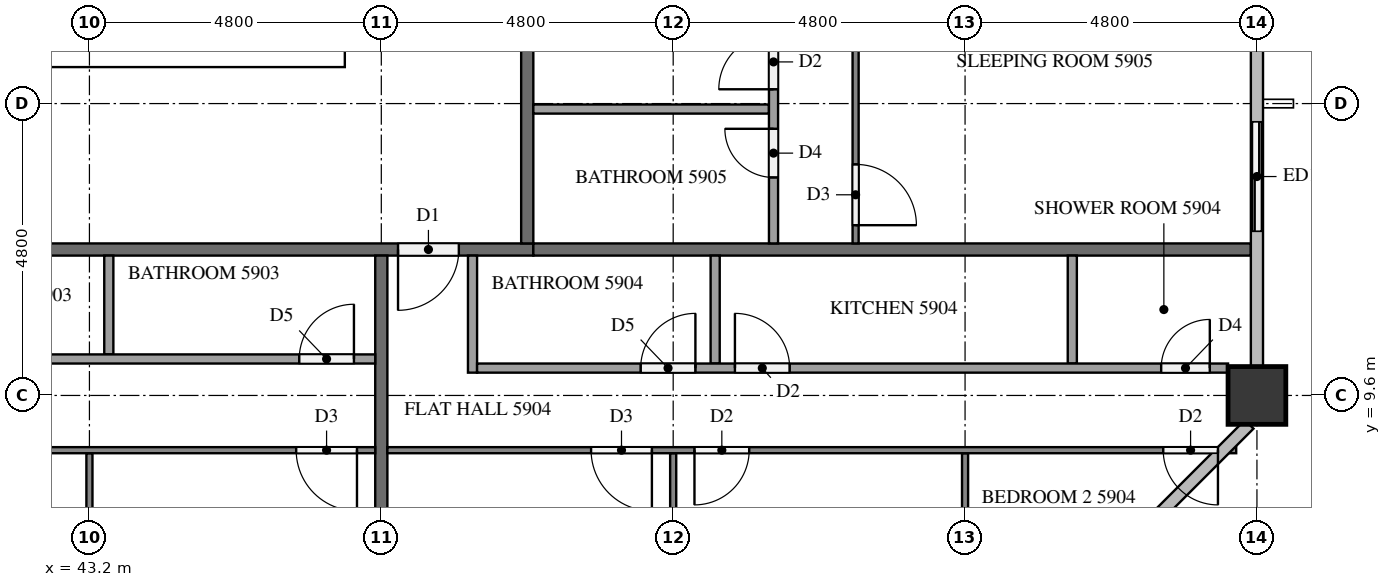
"""IFC4 building model, lengths in metres.
Left out: names, types, materials, properties, quantities, classifications, styles, units other than length and angle.
Written with IfcOpenShell. Run it as: python <this file> out.ifc"""

import sys

from ifc_helpers import new_model, si_unit, direction, frame, frame_2d, origin, origin_2d, place, context, subcontext, project, spatial, rectangle, extrude, element, fill, save


model = new_model("IFC4")
c1 = context("Model", 3, precision=1e-05, world=origin(), true_north=direction((0.0, 1.0)))
c2 = subcontext(c1, "Body", "Model", "MODEL_VIEW")
j1 = project(units=[si_unit("LENGTHUNIT", "METRE"), si_unit("PLANEANGLEUNIT", "RADIAN")], contexts=[c1])
p1 = place(None, origin())
s1 = spatial("IfcSite", under=j1, at=p1, CompositionType="ELEMENT")
p2 = place(p1, origin())
s2 = spatial("IfcBuilding", under=s1, at=p2, CompositionType="ELEMENT")
p3 = place(p2, frame((0.0, 0.0, 226.3)))
s3 = spatial("IfcBuildingStorey", under=s2, at=p3, CompositionType="ELEMENT", Elevation=226.3)
p4 = place(p3, frame((15.0, 15.35, 0.0), z_axis=(0.0, 0.0, 1.0), x_axis=(1.0, 0.0, 0.0)))
e1 = element("IfcWall", 1, at=p4, inside=s3, PredefinedType="SHEAR", context=c2, shape_type="SweptSolid", body=[
    extrude(rectangle(XDim=32.4, YDim=0.7, at=frame_2d((16.2, 0.0))), origin(), (0.0, 0.0, 1.0), 3.2),
])
p5 = place(p4, frame((15.3, 0.0, 0.0)))
e2 = element("IfcOpeningElement", 2, at=p5, cuts=e1, PredefinedType="OPENING", context=c2, shape_type="SweptSolid", body=[
    extrude(rectangle(XDim=1.8, YDim=2.1, at=frame_2d((0.9, 1.05))), frame((0.0, 0.36, 0.0), z_axis=(0.0, -1.0, 0.0), x_axis=(1.0, 0.0, 0.0)), (0.0, 0.0, 1.0), 0.72),
])
p6 = place(p3, frame((62.4, 9.6, 0.0), z_axis=(0.0, 0.0, 1.0), x_axis=(1.0, 0.0, 0.0)))
e3 = element("IfcColumn", 3, at=p6, inside=s3, PredefinedType="COLUMN", context=c2, shape_type="SweptSolid", body=[
    extrude(rectangle(XDim=0.95, YDim=0.95, at=origin_2d()), origin(), (0.0, 0.0, 1.0), 3.2),
])
p7 = place(p3, frame((62.4, 12.0, 0.0), z_axis=(0.0, 0.0, 1.0), x_axis=(0.0, 1.0, 0.0)))
e4 = element("IfcWall", 4, at=p7, inside=s3, PredefinedType="SOLIDWALL", context=c2, shape_type="SweptSolid", body=[
    extrude(rectangle(XDim=2.4, YDim=0.15, at=frame_2d((1.2, 0.0))), origin(), (0.0, 0.0, 1.0), 3.2),
])
p8 = place(p7, frame((0.3, 0.0, 0.0)))
e5 = element("IfcOpeningElement", 5, at=p8, cuts=e4, PredefinedType="OPENING", context=c2, shape_type="SweptSolid", body=[
    extrude(rectangle(XDim=1.8, YDim=2.4, at=frame_2d((0.9, 1.2))), frame((0.0, 0.085, 0.0), z_axis=(0.0, -1.0, 0.0), x_axis=(1.0, 0.0, 0.0)), (0.0, 0.0, 1.0), 0.17),
])
p9 = place(p3, frame((50.5, 12.0, 0.0), z_axis=(0.0, 0.0, 1.0), x_axis=(-1.0, 0.0, 0.0)))
e6 = element("IfcWall", 6, at=p9, inside=s3, PredefinedType="PARTITIONING", context=c2, shape_type="SweptSolid", body=[
    extrude(rectangle(XDim=38.6, YDim=0.2, at=frame_2d((19.3, 0.0))), origin(), (0.0, 0.0, 1.0), 3.2),
])
p10 = place(p9, frame((36.375, 0.0, 0.0)))
e7 = element("IfcOpeningElement", 7, at=p10, cuts=e6, PredefinedType="OPENING", context=c2, shape_type="SweptSolid", body=[
    extrude(rectangle(XDim=1.0, YDim=2.1, at=frame_2d((0.5, 1.05))), frame((0.0, 0.11, 0.0), z_axis=(0.0, -1.0, 0.0), x_axis=(1.0, 0.0, 0.0)), (0.0, 0.0, 1.0), 0.22),
])
p11 = place(p9, frame((34.825, 0.0, 0.0)))
e8 = element("IfcOpeningElement", 8, at=p11, cuts=e6, PredefinedType="OPENING", context=c2, shape_type="SweptSolid", body=[
    extrude(rectangle(XDim=1.0, YDim=2.1, at=frame_2d((0.5, 1.05))), frame((0.0, 0.11, 0.0), z_axis=(0.0, -1.0, 0.0), x_axis=(1.0, 0.0, 0.0)), (0.0, 0.0, 1.0), 0.22),
])
p12 = place(p9, frame((20.375, 0.0, 0.0)))
e9 = element("IfcOpeningElement", 9, at=p12, cuts=e6, PredefinedType="OPENING", context=c2, shape_type="SweptSolid", body=[
    extrude(rectangle(XDim=1.1, YDim=2.1, at=frame_2d((0.55, 1.05))), frame((0.0, 0.11, 0.0), z_axis=(0.0, -1.0, 0.0), x_axis=(1.0, 0.0, 0.0)), (0.0, 0.0, 1.0), 0.22),
])
p13 = place(p9, frame((1.225, 0.0, 0.0)))
e10 = element("IfcOpeningElement", 10, at=p13, cuts=e6, PredefinedType="OPENING", context=c2, shape_type="SweptSolid", body=[
    extrude(rectangle(XDim=1.0, YDim=2.1, at=frame_2d((0.5, 1.05))), frame((0.0, 0.11, 0.0), z_axis=(0.0, -1.0, 0.0), x_axis=(1.0, 0.0, 0.0)), (0.0, 0.0, 1.0), 0.22),
])
p14 = place(p3, frame((50.4, 40.7, 0.0), z_axis=(0.0, 0.0, 1.0), x_axis=(0.0, -1.0, 0.0)))
e11 = element("IfcWall", 11, at=p14, inside=s3, PredefinedType="PARTITIONING", context=c2, shape_type="SweptSolid", body=[
    extrude(rectangle(XDim=28.6, YDim=0.2, at=frame_2d((14.3, 0.0))), origin(), (0.0, 0.0, 1.0), 3.2),
])
p15 = place(p14, frame((21.775, 0.0, 0.0)))
e12 = element("IfcOpeningElement", 12, at=p15, cuts=e11, PredefinedType="OPENING", context=c2, shape_type="SweptSolid", body=[
    extrude(rectangle(XDim=1.0, YDim=2.1, at=frame_2d((0.5, 1.05))), frame((0.0, 0.11, 0.0), z_axis=(0.0, -1.0, 0.0), x_axis=(1.0, 0.0, 0.0)), (0.0, 0.0, 1.0), 0.22),
])
p16 = place(p14, frame((7.375, 0.0, 0.0)))
e13 = element("IfcOpeningElement", 13, at=p16, cuts=e11, PredefinedType="OPENING", context=c2, shape_type="SweptSolid", body=[
    extrude(rectangle(XDim=1.0, YDim=2.1, at=frame_2d((0.5, 1.05))), frame((0.0, 0.11, 0.0), z_axis=(0.0, -1.0, 0.0), x_axis=(1.0, 0.0, 0.0)), (0.0, 0.0, 1.0), 0.22),
])
p17 = place(p14, frame((0.175, 0.0, 0.0)))
e14 = element("IfcOpeningElement", 14, at=p17, cuts=e11, PredefinedType="OPENING", context=c2, shape_type="SweptSolid", body=[
    extrude(rectangle(XDim=1.0, YDim=2.1, at=frame_2d((0.5, 1.05))), frame((0.0, 0.11, 0.0), z_axis=(0.0, -1.0, 0.0), x_axis=(1.0, 0.0, 0.0)), (0.0, 0.0, 1.0), 0.22),
])
p18 = place(p3, frame((48.0, 11.9, 0.0), z_axis=(0.0, 0.0, 1.0), x_axis=(0.0, -1.0, 0.0)))
e15 = element("IfcWall", 15, at=p18, inside=s3, PredefinedType="PARTITIONING", context=c2, shape_type="SweptSolid", body=[
    extrude(rectangle(XDim=6.775, YDim=0.2, at=frame_2d((3.387, 0.0))), origin(), (0.0, 0.0, 1.0), 3.2),
])
p19 = place(p3, frame((50.5, 12.0, 0.0), z_axis=(0.0, 0.0, 1.0), x_axis=(1.0, 0.0, 0.0)))
e16 = element("IfcWall", 16, at=p19, inside=s3, PredefinedType="PARTITIONING", context=c2, shape_type="SweptSolid", body=[
    extrude(rectangle(XDim=11.8, YDim=0.2, at=frame_2d((5.9, 0.0))), origin(), (0.0, 0.0, 1.0), 3.2),
])
p20 = place(p3, frame((43.2, 8.65, 0.0), z_axis=(0.0, 0.0, 1.0), x_axis=(0.0, -1.0, 0.0)))
e17 = element("IfcWall", 17, at=p20, inside=s3, PredefinedType="PARTITIONING", context=c2, shape_type="SweptSolid", body=[
    extrude(rectangle(XDim=3.75, YDim=0.1, at=frame_2d((1.875, 0.0))), origin(), (0.0, 0.0, 1.0), 3.2),
])
p21 = place(p3, frame((47.9, 8.7, 0.0), z_axis=(0.0, 0.0, 1.0), x_axis=(-1.0, 0.0, 0.0)))
e18 = element("IfcWall", 18, at=p21, inside=s3, PredefinedType="PARTITIONING", context=c2, shape_type="SweptSolid", body=[
    extrude(rectangle(XDim=19.0, YDim=0.1, at=frame_2d((9.5, 0.0))), origin(), (0.0, 0.0, 1.0), 3.2),
])
p22 = place(p21, frame((17.8, 0.0, 0.0)))
e19 = element("IfcOpeningElement", 19, at=p22, cuts=e18, PredefinedType="OPENING", context=c2, shape_type="SweptSolid", body=[
    extrude(rectangle(XDim=0.9, YDim=2.1, at=frame_2d((0.45, 1.05))), frame((0.0, 0.06, 0.0), z_axis=(0.0, -1.0, 0.0), x_axis=(1.0, 0.0, 0.0)), (0.0, 0.0, 1.0), 0.12),
])
p23 = place(p21, frame((9.85, 0.0, 0.0)))
e20 = element("IfcOpeningElement", 20, at=p23, cuts=e18, PredefinedType="OPENING", context=c2, shape_type="SweptSolid", body=[
    extrude(rectangle(XDim=0.9, YDim=2.1, at=frame_2d((0.45, 1.05))), frame((0.0, 0.06, 0.0), z_axis=(0.0, -1.0, 0.0), x_axis=(1.0, 0.0, 0.0)), (0.0, 0.0, 1.0), 0.12),
])
p24 = place(p21, frame((8.25, 0.0, 0.0)))
e21 = element("IfcOpeningElement", 21, at=p24, cuts=e18, PredefinedType="OPENING", context=c2, shape_type="SweptSolid", body=[
    extrude(rectangle(XDim=0.9, YDim=2.1, at=frame_2d((0.45, 1.05))), frame((0.0, 0.06, 0.0), z_axis=(0.0, -1.0, 0.0), x_axis=(1.0, 0.0, 0.0)), (0.0, 0.0, 1.0), 0.12),
])
p25 = place(p21, frame((0.3, 0.0, 0.0)))
e22 = element("IfcOpeningElement", 22, at=p25, cuts=e18, PredefinedType="OPENING", context=c2, shape_type="SweptSolid", body=[
    extrude(rectangle(XDim=1.0, YDim=2.1, at=frame_2d((0.5, 1.05))), frame((0.0, 0.06, 0.0), z_axis=(0.0, -1.0, 0.0), x_axis=(1.0, 0.0, 0.0)), (0.0, 0.0, 1.0), 0.12),
])
p26 = place(p3, frame((43.519, 11.9, 0.0), z_axis=(0.0, 0.0, 1.0), x_axis=(0.0, -1.0, 0.0)))
e23 = element("IfcWall", 23, at=p26, inside=s3, PredefinedType="PARTITIONING", context=c2, shape_type="SweptSolid", body=[
    extrude(rectangle(XDim=1.625, YDim=0.15, at=frame_2d((0.812, 0.0))), origin(), (0.0, 0.0, 1.0), 3.2),
])
p27 = place(p3, frame((30.375, 10.2, 0.0), z_axis=(0.0, 0.0, 1.0), x_axis=(1.0, 0.0, 0.0)))
e24 = element("IfcWall", 24, at=p27, inside=s3, PredefinedType="PARTITIONING", context=c2, shape_type="SweptSolid", body=[
    extrude(rectangle(XDim=17.525, YDim=0.15, at=frame_2d((8.762, 0.0))), origin(), (0.0, 0.0, 1.0), 3.2),
])
p28 = place(p27, frame((0.3, 0.0, 0.0)))
e25 = element("IfcOpeningElement", 25, at=p28, cuts=e24, PredefinedType="OPENING", context=c2, shape_type="SweptSolid", body=[
    extrude(rectangle(XDim=0.9, YDim=2.1, at=frame_2d((0.45, 1.05))), frame((0.0, 0.085, 0.0), z_axis=(0.0, -1.0, 0.0), x_axis=(1.0, 0.0, 0.0)), (0.0, 0.0, 1.0), 0.17),
])
p29 = place(p27, frame((8.733, 0.0, 0.0)))
e26 = element("IfcOpeningElement", 26, at=p29, cuts=e24, PredefinedType="OPENING", context=c2, shape_type="SweptSolid", body=[
    extrude(rectangle(XDim=0.8, YDim=2.1, at=frame_2d((0.4, 1.05))), frame((0.0, 0.085, 0.0), z_axis=(0.0, -1.0, 0.0), x_axis=(1.0, 0.0, 0.0)), (0.0, 0.0, 1.0), 0.17),
])
p30 = place(p27, frame((10.183, 0.0, 0.0)))
e27 = element("IfcOpeningElement", 27, at=p30, cuts=e24, PredefinedType="OPENING", context=c2, shape_type="SweptSolid", body=[
    extrude(rectangle(XDim=0.8, YDim=2.1, at=frame_2d((0.4, 1.05))), frame((0.0, 0.085, 0.0), z_axis=(0.0, -1.0, 0.0), x_axis=(1.0, 0.0, 0.0)), (0.0, 0.0, 1.0), 0.17),
])
p31 = place(p27, frame((16.275, 0.0, 0.0)))
e28 = element("IfcOpeningElement", 28, at=p31, cuts=e24, PredefinedType="OPENING", context=c2, shape_type="SweptSolid", body=[
    extrude(rectangle(XDim=0.9, YDim=2.1, at=frame_2d((0.45, 1.05))), frame((0.0, 0.085, 0.0), z_axis=(0.0, -1.0, 0.0), x_axis=(1.0, 0.0, 0.0)), (0.0, 0.0, 1.0), 0.17),
])
p32 = place(p3, frame((52.8, 8.65, 0.0), z_axis=(0.0, 0.0, 1.0), x_axis=(0.0, -1.0, 0.0)))
e29 = element("IfcWall", 29, at=p32, inside=s3, PredefinedType="PARTITIONING", context=c2, shape_type="SweptSolid", body=[
    extrude(rectangle(XDim=3.75, YDim=0.1, at=frame_2d((1.875, 0.0))), origin(), (0.0, 0.0, 1.0), 3.2),
])
p33 = place(p3, frame((57.6, 8.65, 0.0), z_axis=(0.0, 0.0, 1.0), x_axis=(0.0, -1.0, 0.0)))
e30 = element("IfcWall", 30, at=p33, inside=s3, PredefinedType="PARTITIONING", context=c2, shape_type="SweptSolid", body=[
    extrude(rectangle(XDim=3.375, YDim=0.1, at=frame_2d((1.688, 0.0))), origin(), (0.0, 0.0, 1.0), 3.2),
])
p34 = place(p3, frame((62.059, 8.7, 0.0), z_axis=(0.0, 0.0, 1.0), x_axis=(-1.0, 0.0, 0.0)))
e31 = element("IfcWall", 31, at=p34, inside=s3, PredefinedType="PARTITIONING", context=c2, shape_type="SweptSolid", body=[
    extrude(rectangle(XDim=13.959, YDim=0.1, at=frame_2d((6.979, 0.0))), origin(), (0.0, 0.0, 1.0), 3.2),
])
p35 = place(p34, frame((9.609, 0.0, 0.0)))
e32 = element("IfcOpeningElement", 32, at=p35, cuts=e31, PredefinedType="OPENING", context=c2, shape_type="SweptSolid", body=[
    extrude(rectangle(XDim=1.0, YDim=2.1, at=frame_2d((0.5, 1.05))), frame((0.0, 0.06, 0.0), z_axis=(0.0, -1.0, 0.0), x_axis=(1.0, 0.0, 0.0)), (0.0, 0.0, 1.0), 0.12),
])
p36 = place(p34, frame((8.009, 0.0, 0.0)))
e33 = element("IfcOpeningElement", 33, at=p36, cuts=e31, PredefinedType="OPENING", context=c2, shape_type="SweptSolid", body=[
    extrude(rectangle(XDim=0.9, YDim=2.1, at=frame_2d((0.45, 1.05))), frame((0.0, 0.06, 0.0), z_axis=(0.0, -1.0, 0.0), x_axis=(1.0, 0.0, 0.0)), (0.0, 0.0, 1.0), 0.12),
])
p37 = place(p34, frame((0.3, 0.0, 0.0)))
e34 = element("IfcOpeningElement", 34, at=p37, cuts=e31, PredefinedType="OPENING", context=c2, shape_type="SweptSolid", body=[
    extrude(rectangle(XDim=0.9, YDim=2.1, at=frame_2d((0.45, 1.05))), frame((0.0, 0.06, 0.0), z_axis=(0.0, -1.0, 0.0), x_axis=(1.0, 0.0, 0.0)), (0.0, 0.0, 1.0), 0.12),
])
for number, where, z_axis, x_axis in (
    (35, (53.49, 11.9, 0.0), (0.0, 0.0, 1.0), (0.0, -1.0, 0.0)),
    (36, (59.364, 11.9, 0.0), (0.0, 0.0, 1.0), (0.0, -1.0, 0.0)),
):
    element("IfcWall", number, at=place(p3, frame(where, z_axis=z_axis, x_axis=x_axis)), inside=s3, PredefinedType="PARTITIONING", context=c2, shape_type="SweptSolid", body=[
        extrude(rectangle(XDim=1.775, YDim=0.15, at=frame_2d((0.887, 0.0))), origin(), (0.0, 0.0, 1.0), 3.2),
    ])
p38 = place(p3, frame((49.5, 11.9, 0.0), z_axis=(0.0, 0.0, 1.0), x_axis=(0.0, -1.0, 0.0)))
e37 = element("IfcWall", 37, at=p38, inside=s3, PredefinedType="PARTITIONING", context=c2, shape_type="SweptSolid", body=[
    extrude(rectangle(XDim=1.925, YDim=0.15, at=frame_2d((0.962, 0.0))), origin(), (0.0, 0.0, 1.0), 3.2),
])
p39 = place(p3, frame((49.575, 10.05, 0.0), z_axis=(0.0, 0.0, 1.0), x_axis=(1.0, 0.0, 0.0)))
e38 = element("IfcWall", 38, at=p39, inside=s3, PredefinedType="PARTITIONING", context=c2, shape_type="SweptSolid", body=[
    extrude(rectangle(XDim=12.35, YDim=0.15, at=frame_2d((6.175, 0.0))), origin(), (0.0, 0.0, 1.0), 3.2),
])
p40 = place(p39, frame((2.69, 0.0, 0.0)))
e39 = element("IfcOpeningElement", 39, at=p40, cuts=e38, PredefinedType="OPENING", context=c2, shape_type="SweptSolid", body=[
    extrude(rectangle(XDim=0.9, YDim=2.1, at=frame_2d((0.45, 1.05))), frame((0.0, 0.085, 0.0), z_axis=(0.0, -1.0, 0.0), x_axis=(1.0, 0.0, 0.0)), (0.0, 0.0, 1.0), 0.17),
])
p41 = place(p39, frame((4.24, 0.0, 0.0)))
e40 = element("IfcOpeningElement", 40, at=p41, cuts=e38, PredefinedType="OPENING", context=c2, shape_type="SweptSolid", body=[
    extrude(rectangle(XDim=0.9, YDim=2.1, at=frame_2d((0.45, 1.05))), frame((0.0, 0.085, 0.0), z_axis=(0.0, -1.0, 0.0), x_axis=(1.0, 0.0, 0.0)), (0.0, 0.0, 1.0), 0.17),
])
p42 = place(p39, frame((11.25, 0.0, 0.0)))
e41 = element("IfcOpeningElement", 41, at=p42, cuts=e38, PredefinedType="OPENING", context=c2, shape_type="SweptSolid", body=[
    extrude(rectangle(XDim=0.8, YDim=2.1, at=frame_2d((0.4, 1.05))), frame((0.0, 0.085, 0.0), z_axis=(0.0, -1.0, 0.0), x_axis=(1.0, 0.0, 0.0)), (0.0, 0.0, 1.0), 0.17),
])
p43 = place(p3, frame((55.8, 19.1, 0.0), z_axis=(0.0, 0.0, 1.0), x_axis=(0.0, -1.0, 0.0)))
e42 = element("IfcWall", 42, at=p43, inside=s3, PredefinedType="PARTITIONING", context=c2, shape_type="SweptSolid", body=[
    extrude(rectangle(XDim=7.0, YDim=0.1, at=frame_2d((3.5, 0.0))), origin(), (0.0, 0.0, 1.0), 3.2),
])
p44 = place(p43, frame((5.7, 0.0, 0.0)))
e43 = element("IfcOpeningElement", 43, at=p44, cuts=e42, PredefinedType="OPENING", context=c2, shape_type="SweptSolid", body=[
    extrude(rectangle(XDim=1.0, YDim=2.1, at=frame_2d((0.5, 1.05))), frame((0.0, 0.06, 0.0), z_axis=(0.0, -1.0, 0.0), x_axis=(1.0, 0.0, 0.0)), (0.0, 0.0, 1.0), 0.12),
])
p45 = place(p3, frame((50.5, 14.31, 0.0), z_axis=(0.0, 0.0, 1.0), x_axis=(1.0, 0.0, 0.0)))
e44 = element("IfcWall", 44, at=p45, inside=s3, PredefinedType="PARTITIONING", context=c2, shape_type="SweptSolid", body=[
    extrude(rectangle(XDim=3.875, YDim=0.15, at=frame_2d((1.938, 0.0))), origin(), (0.0, 0.0, 1.0), 3.2),
])
p46 = place(p3, frame((54.45, 12.1, 0.0), z_axis=(0.0, 0.0, 1.0), x_axis=(0.0, 1.0, 0.0)))
e45 = element("IfcWall", 45, at=p46, inside=s3, PredefinedType="PARTITIONING", context=c2, shape_type="SweptSolid", body=[
    extrude(rectangle(XDim=5.525, YDim=0.15, at=frame_2d((2.762, 0.0))), origin(), (0.0, 0.0, 1.0), 3.2),
])
p47 = place(p46, frame((2.535, 0.0, 0.0)))
e46 = element("IfcOpeningElement", 46, at=p47, cuts=e45, PredefinedType="OPENING", context=c2, shape_type="SweptSolid", body=[
    extrude(rectangle(XDim=0.9, YDim=2.1, at=frame_2d((0.45, 1.05))), frame((0.0, 0.085, 0.0), z_axis=(0.0, -1.0, 0.0), x_axis=(1.0, 0.0, 0.0)), (0.0, 0.0, 1.0), 0.17),
])
p48 = place(p46, frame((1.085, 0.0, 0.0)))
e47 = element("IfcOpeningElement", 47, at=p48, cuts=e45, PredefinedType="OPENING", context=c2, shape_type="SweptSolid", body=[
    extrude(rectangle(XDim=0.8, YDim=2.1, at=frame_2d((0.4, 1.05))), frame((0.0, 0.085, 0.0), z_axis=(0.0, -1.0, 0.0), x_axis=(1.0, 0.0, 0.0)), (0.0, 0.0, 1.0), 0.17),
])
p49 = place(p8, origin())
e48 = element("IfcDoor", 48, at=p49, inside=s3, OperationType="SLIDING_TO_LEFT", PredefinedType="DOOR", context=c2, shape_type="SweptSolid", body=[
    extrude(rectangle(XDim=1.8, YDim=2.4, at=frame_2d((0.9, 1.2))), frame((0.0, 0.025, 0.0), z_axis=(0.0, -1.0, 0.0), x_axis=(1.0, 0.0, 0.0)), (0.0, 0.0, 1.0), 0.05),
])
fill(e5, e48)
p50 = place(p13, origin())
e49 = element("IfcDoor", 49, at=p50, inside=s3, OperationType="SINGLE_SWING_RIGHT", PredefinedType="DOOR", context=c2, shape_type="SweptSolid", body=[
    extrude(rectangle(XDim=1.0, YDim=2.1, at=frame_2d((0.5, 1.05))), frame((0.0, 0.025, 0.0), z_axis=(0.0, -1.0, 0.0), x_axis=(1.0, 0.0, 0.0)), (0.0, 0.0, 1.0), 0.05),
])
fill(e10, e49)
p51 = place(p25, origin())
e50 = element("IfcDoor", 50, at=p51, inside=s3, OperationType="SINGLE_SWING_LEFT", PredefinedType="DOOR", context=c2, shape_type="SweptSolid", body=[
    extrude(rectangle(XDim=1.0, YDim=2.1, at=frame_2d((0.5, 1.05))), frame((0.0, 0.025, 0.0), z_axis=(0.0, -1.0, 0.0), x_axis=(1.0, 0.0, 0.0)), (0.0, 0.0, 1.0), 0.05),
])
fill(e22, e50)
p52 = place(p31, origin())
e51 = element("IfcDoor", 51, at=p52, inside=s3, OperationType="SINGLE_SWING_RIGHT", PredefinedType="DOOR", context=c2, shape_type="SweptSolid", body=[
    extrude(rectangle(XDim=0.9, YDim=2.1, at=frame_2d((0.45, 1.05))), frame((0.0, 0.025, 0.0), z_axis=(0.0, -1.0, 0.0), x_axis=(1.0, 0.0, 0.0)), (0.0, 0.0, 1.0), 0.05),
])
fill(e28, e51)
p53 = place(p35, origin())
e52 = element("IfcDoor", 52, at=p53, inside=s3, OperationType="SINGLE_SWING_LEFT", PredefinedType="DOOR", context=c2, shape_type="SweptSolid", body=[
    extrude(rectangle(XDim=1.0, YDim=2.1, at=frame_2d((0.5, 1.05))), frame((0.0, 0.025, 0.0), z_axis=(0.0, -1.0, 0.0), x_axis=(1.0, 0.0, 0.0)), (0.0, 0.0, 1.0), 0.05),
])
fill(e32, e52)
p54 = place(p36, origin())
e53 = element("IfcDoor", 53, at=p54, inside=s3, OperationType="SINGLE_SWING_RIGHT", PredefinedType="DOOR", context=c2, shape_type="SweptSolid", body=[
    extrude(rectangle(XDim=0.9, YDim=2.1, at=frame_2d((0.45, 1.05))), frame((0.0, 0.025, 0.0), z_axis=(0.0, -1.0, 0.0), x_axis=(1.0, 0.0, 0.0)), (0.0, 0.0, 1.0), 0.05),
])
fill(e33, e53)
p55 = place(p37, origin())
e54 = element("IfcDoor", 54, at=p55, inside=s3, OperationType="SINGLE_SWING_LEFT", PredefinedType="DOOR", context=c2, shape_type="SweptSolid", body=[
    extrude(rectangle(XDim=0.9, YDim=2.1, at=frame_2d((0.45, 1.05))), frame((0.0, 0.025, 0.0), z_axis=(0.0, -1.0, 0.0), x_axis=(1.0, 0.0, 0.0)), (0.0, 0.0, 1.0), 0.05),
])
fill(e34, e54)
p56 = place(p40, origin())
e55 = element("IfcDoor", 55, at=p56, inside=s3, OperationType="SINGLE_SWING_RIGHT", PredefinedType="DOOR", context=c2, shape_type="SweptSolid", body=[
    extrude(rectangle(XDim=0.9, YDim=2.1, at=frame_2d((0.45, 1.05))), frame((0.0, 0.025, 0.0), z_axis=(0.0, -1.0, 0.0), x_axis=(1.0, 0.0, 0.0)), (0.0, 0.0, 1.0), 0.05),
])
fill(e39, e55)
p57 = place(p41, origin())
e56 = element("IfcDoor", 56, at=p57, inside=s3, OperationType="SINGLE_SWING_LEFT", PredefinedType="DOOR", context=c2, shape_type="SweptSolid", body=[
    extrude(rectangle(XDim=0.9, YDim=2.1, at=frame_2d((0.45, 1.05))), frame((0.0, 0.025, 0.0), z_axis=(0.0, -1.0, 0.0), x_axis=(1.0, 0.0, 0.0)), (0.0, 0.0, 1.0), 0.05),
])
fill(e40, e56)
p58 = place(p42, origin())
e57 = element("IfcDoor", 57, at=p58, inside=s3, OperationType="SINGLE_SWING_RIGHT", PredefinedType="DOOR", context=c2, shape_type="SweptSolid", body=[
    extrude(rectangle(XDim=0.8, YDim=2.1, at=frame_2d((0.4, 1.05))), frame((0.0, 0.025, 0.0), z_axis=(0.0, -1.0, 0.0), x_axis=(1.0, 0.0, 0.0)), (0.0, 0.0, 1.0), 0.05),
])
fill(e41, e57)
p59 = place(p44, origin())
e58 = element("IfcDoor", 58, at=p59, inside=s3, OperationType="SINGLE_SWING_RIGHT", PredefinedType="DOOR", context=c2, shape_type="SweptSolid", body=[
    extrude(rectangle(XDim=1.0, YDim=2.1, at=frame_2d((0.5, 1.05))), frame((0.0, 0.025, 0.0), z_axis=(0.0, -1.0, 0.0), x_axis=(1.0, 0.0, 0.0)), (0.0, 0.0, 1.0), 0.05),
])
fill(e43, e58)
p60 = place(p47, origin())
e59 = element("IfcDoor", 59, at=p60, inside=s3, OperationType="SINGLE_SWING_LEFT", PredefinedType="DOOR", context=c2, shape_type="SweptSolid", body=[
    extrude(rectangle(XDim=0.9, YDim=2.1, at=frame_2d((0.45, 1.05))), frame((0.0, 0.025, 0.0), z_axis=(0.0, -1.0, 0.0), x_axis=(1.0, 0.0, 0.0)), (0.0, 0.0, 1.0), 0.05),
])
fill(e46, e59)
p61 = place(p48, origin())
e60 = element("IfcDoor", 60, at=p61, inside=s3, OperationType="SINGLE_SWING_RIGHT", PredefinedType="DOOR", context=c2, shape_type="SweptSolid", body=[
    extrude(rectangle(XDim=0.8, YDim=2.1, at=frame_2d((0.4, 1.05))), frame((0.0, 0.025, 0.0), z_axis=(0.0, -1.0, 0.0), x_axis=(1.0, 0.0, 0.0)), (0.0, 0.0, 1.0), 0.05),
])
fill(e47, e60)
save(model, sys.argv[1])
